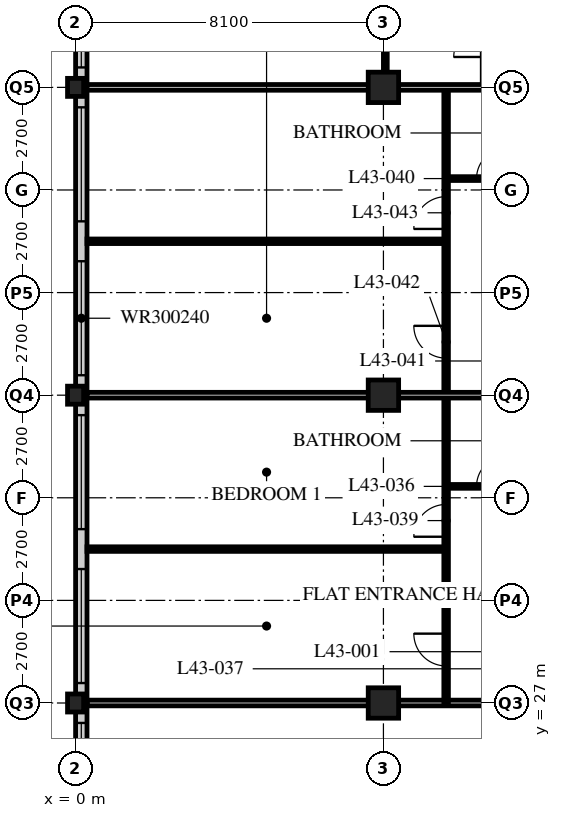
"""IFC4 building model, lengths in metres.
Left out: names, types, materials, properties, quantities, classifications, styles, units other than length and angle.
Written with IfcOpenShell. Run it as: python <this file> out.ifc"""

import sys

from ifc_helpers import new_model, si_unit, direction, frame, frame_2d, origin, origin_2d, place, context, subcontext, project, spatial, rectangle, hollow_rectangle, i_section, extrude, element, fill, save


model = new_model("IFC4")
c1 = context("Model", 3, precision=1e-05, world=origin(), true_north=direction((0.0, 1.0)))
c2 = subcontext(c1, "Body", "Model", "MODEL_VIEW")
j1 = project(units=[si_unit("LENGTHUNIT", "METRE"), si_unit("PLANEANGLEUNIT", "RADIAN")], contexts=[c1])
p1 = place(None, origin())
s1 = spatial("IfcSite", under=j1, at=p1, CompositionType="ELEMENT")
p2 = place(p1, origin())
s2 = spatial("IfcBuilding", under=s1, at=p2, CompositionType="ELEMENT")
p3 = place(p2, frame((0.0, 0.0, 170.4)))
s3 = spatial("IfcBuildingStorey", under=s2, at=p3, CompositionType="ELEMENT", Elevation=170.4)
for number, where, z_axis, x_axis in (
    (1, (0.0, 27.0, 0.0), (0.0, 0.0, 1.0), (1.0, 0.0, 0.0)),
    (2, (0.0, 35.1, 0.0), (0.0, 0.0, 1.0), (1.0, 0.0, 0.0)),
    (3, (0.0, 43.2, 0.0), (0.0, 0.0, 1.0), (1.0, 0.0, 0.0)),
):
    element("IfcColumn", number, at=place(p3, frame(where, z_axis=z_axis, x_axis=x_axis)), inside=s3, PredefinedType="COLUMN", context=c2, shape_type="SweptSolid", body=[
        extrude(i_section(OverallWidth=0.424, OverallDepth=0.475, WebThickness=0.048, FlangeThickness=0.077, FilletRadius=0.015, at=origin_2d()), origin(), (0.0, 0.0, 1.0), 3.6),
    ])
for number, where, z_axis, x_axis in (
    (4, (8.1, 27.0, 0.0), (0.0, 0.0, 1.0), (1.0, 0.0, 0.0)),
    (5, (8.1, 35.1, 0.0), (0.0, 0.0, 1.0), (1.0, 0.0, 0.0)),
    (6, (8.1, 43.2, 0.0), (0.0, 0.0, 1.0), (1.0, 0.0, 0.0)),
):
    element("IfcColumn", number, at=place(p3, frame(where, z_axis=z_axis, x_axis=x_axis)), inside=s3, PredefinedType="COLUMN", context=c2, shape_type="SweptSolid", body=[
        extrude(hollow_rectangle(XDim=0.8, YDim=0.8, WallThickness=0.08, at=origin_2d()), origin(), (0.0, 0.0, 1.0), 3.6),
    ])
p4 = place(p3, frame((0.15, 51.0, 0.0), z_axis=(0.0, 0.0, 1.0), x_axis=(0.0, -1.0, 0.0)))
e7 = element("IfcWall", 7, at=p4, inside=s3, PredefinedType="SOLIDWALL", context=c2, shape_type="SweptSolid", body=[
    extrude(rectangle(XDim=32.1, YDim=0.3, at=frame_2d((16.05, 0.0))), origin(), (0.0, 0.0, 1.0), 3.39),
])
p5 = place(p4, frame((0.225, 0.0, 0.6)))
e8 = element("IfcOpeningElement", 8, at=p5, cuts=e7, PredefinedType="OPENING", context=c2, shape_type="SweptSolid", body=[
    extrude(rectangle(XDim=3.0, YDim=2.4, at=frame_2d((1.5, 1.2))), frame((0.0, 0.16, 0.0), z_axis=(0.0, -1.0, 0.0), x_axis=(1.0, 0.0, 0.0)), (0.0, 0.0, 1.0), 0.32),
])
p6 = place(p4, frame((4.275, 0.0, 0.6)))
e9 = element("IfcOpeningElement", 9, at=p6, cuts=e7, PredefinedType="OPENING", context=c2, shape_type="SweptSolid", body=[
    extrude(rectangle(XDim=3.0, YDim=2.4, at=frame_2d((1.5, 1.2))), frame((0.0, 0.16, 0.0), z_axis=(0.0, -1.0, 0.0), x_axis=(1.0, 0.0, 0.0)), (0.0, 0.0, 1.0), 0.32),
])
p7 = place(p4, frame((8.325, 0.0, 0.6)))
e10 = element("IfcOpeningElement", 10, at=p7, cuts=e7, PredefinedType="OPENING", context=c2, shape_type="SweptSolid", body=[
    extrude(rectangle(XDim=3.0, YDim=2.4, at=frame_2d((1.5, 1.2))), frame((0.0, 0.16, 0.0), z_axis=(0.0, -1.0, 0.0), x_axis=(1.0, 0.0, 0.0)), (0.0, 0.0, 1.0), 0.32),
])
p8 = place(p4, frame((12.375, 0.0, 0.6)))
e11 = element("IfcOpeningElement", 11, at=p8, cuts=e7, PredefinedType="OPENING", context=c2, shape_type="SweptSolid", body=[
    extrude(rectangle(XDim=3.0, YDim=2.4, at=frame_2d((1.5, 1.2))), frame((0.0, 0.16, 0.0), z_axis=(0.0, -1.0, 0.0), x_axis=(1.0, 0.0, 0.0)), (0.0, 0.0, 1.0), 0.32),
])
p9 = place(p4, frame((16.425, 0.0, 0.6)))
e12 = element("IfcOpeningElement", 12, at=p9, cuts=e7, PredefinedType="OPENING", context=c2, shape_type="SweptSolid", body=[
    extrude(rectangle(XDim=3.0, YDim=2.4, at=frame_2d((1.5, 1.2))), frame((0.0, 0.16, 0.0), z_axis=(0.0, -1.0, 0.0), x_axis=(1.0, 0.0, 0.0)), (0.0, 0.0, 1.0), 0.32),
])
p10 = place(p4, frame((20.475, 0.0, 0.6)))
e13 = element("IfcOpeningElement", 13, at=p10, cuts=e7, PredefinedType="OPENING", context=c2, shape_type="SweptSolid", body=[
    extrude(rectangle(XDim=3.0, YDim=2.4, at=frame_2d((1.5, 1.2))), frame((0.0, 0.16, 0.0), z_axis=(0.0, -1.0, 0.0), x_axis=(1.0, 0.0, 0.0)), (0.0, 0.0, 1.0), 0.32),
])
p11 = place(p4, frame((24.525, 0.0, 0.6)))
e14 = element("IfcOpeningElement", 14, at=p11, cuts=e7, PredefinedType="OPENING", context=c2, shape_type="SweptSolid", body=[
    extrude(rectangle(XDim=3.0, YDim=2.4, at=frame_2d((1.5, 1.2))), frame((0.0, 0.16, 0.0), z_axis=(0.0, -1.0, 0.0), x_axis=(1.0, 0.0, 0.0)), (0.0, 0.0, 1.0), 0.32),
])
p12 = place(p4, frame((28.575, 0.0, 0.6)))
e15 = element("IfcOpeningElement", 15, at=p12, cuts=e7, PredefinedType="OPENING", context=c2, shape_type="SweptSolid", body=[
    extrude(rectangle(XDim=3.0, YDim=2.4, at=frame_2d((1.5, 1.2))), frame((0.0, 0.16, 0.0), z_axis=(0.0, -1.0, 0.0), x_axis=(1.0, 0.0, 0.0)), (0.0, 0.0, 1.0), 0.32),
])
p13 = place(p3, frame((12.15, 27.0, 0.0), z_axis=(0.0, 0.0, 1.0), x_axis=(-1.0, 0.0, 0.0)))
e16 = element("IfcWall", 16, at=p13, inside=s3, PredefinedType="PARTITIONING", context=c2, shape_type="SweptSolid", body=[
    extrude(rectangle(XDim=11.85, YDim=0.15, at=frame_2d((5.925, 0.0))), origin(), (0.0, 0.0, 1.0), 2.778),
])
p14 = place(p3, frame((9.75, 27.0, 0.0), z_axis=(0.0, 0.0, 1.0), x_axis=(0.0, 1.0, 0.0)))
e17 = element("IfcWall", 17, at=p14, inside=s3, PredefinedType="PARTITIONING", context=c2, shape_type="SweptSolid", body=[
    extrude(rectangle(XDim=16.2, YDim=0.12, at=frame_2d((8.1, 0.0))), origin(), (0.0, 0.0, 1.0), 3.39),
])
p15 = place(p14, frame((0.975, 0.0, 0.0)))
e18 = element("IfcOpeningElement", 18, at=p15, cuts=e17, PredefinedType="OPENING", context=c2, shape_type="SweptSolid", body=[
    extrude(rectangle(XDim=0.85, YDim=2.1, at=frame_2d((0.425, 1.05))), frame((0.0, 0.07, 0.0), z_axis=(0.0, -1.0, 0.0), x_axis=(1.0, 0.0, 0.0)), (0.0, 0.0, 1.0), 0.14),
])
p16 = place(p14, frame((4.375, 0.0, 0.0)))
e19 = element("IfcOpeningElement", 19, at=p16, cuts=e17, PredefinedType="OPENING", context=c2, shape_type="SweptSolid", body=[
    extrude(rectangle(XDim=0.85, YDim=2.1, at=frame_2d((0.425, 1.05))), frame((0.0, 0.07, 0.0), z_axis=(0.0, -1.0, 0.0), x_axis=(1.0, 0.0, 0.0)), (0.0, 0.0, 1.0), 0.14),
])
p17 = place(p14, frame((9.075, 0.0, 0.0)))
e20 = element("IfcOpeningElement", 20, at=p17, cuts=e17, PredefinedType="OPENING", context=c2, shape_type="SweptSolid", body=[
    extrude(rectangle(XDim=0.85, YDim=2.1, at=frame_2d((0.425, 1.05))), frame((0.0, 0.07, 0.0), z_axis=(0.0, -1.0, 0.0), x_axis=(1.0, 0.0, 0.0)), (0.0, 0.0, 1.0), 0.14),
])
p18 = place(p14, frame((12.475, 0.0, 0.0)))
e21 = element("IfcOpeningElement", 21, at=p18, cuts=e17, PredefinedType="OPENING", context=c2, shape_type="SweptSolid", body=[
    extrude(rectangle(XDim=0.85, YDim=2.1, at=frame_2d((0.425, 1.05))), frame((0.0, 0.07, 0.0), z_axis=(0.0, -1.0, 0.0), x_axis=(1.0, 0.0, 0.0)), (0.0, 0.0, 1.0), 0.14),
])
p19 = place(p3, frame((12.15, 32.7, 0.0), z_axis=(0.0, 0.0, 1.0), x_axis=(-1.0, 0.0, 0.0)))
e22 = element("IfcWall", 22, at=p19, inside=s3, PredefinedType="PARTITIONING", context=c2, shape_type="SweptSolid", body=[
    extrude(rectangle(XDim=2.4, YDim=0.1, at=frame_2d((1.2, 0.0))), origin(), (0.0, 0.0, 1.0), 3.39),
])
p20 = place(p19, frame((0.8, 0.0, 0.0)))
e23 = element("IfcOpeningElement", 23, at=p20, cuts=e22, PredefinedType="OPENING", context=c2, shape_type="SweptSolid", body=[
    extrude(rectangle(XDim=0.8, YDim=2.1, at=frame_2d((0.4, 1.05))), frame((0.0, 0.06, 0.0), z_axis=(0.0, -1.0, 0.0), x_axis=(1.0, 0.0, 0.0)), (0.0, 0.0, 1.0), 0.12),
])
p21 = place(p3, frame((9.75, 31.05, 0.0), z_axis=(0.0, 0.0, 1.0), x_axis=(-1.0, 0.0, 0.0)))
e24 = element("IfcWall", 24, at=p21, inside=s3, PredefinedType="PARTITIONING", context=c2, shape_type="SweptSolid", body=[
    extrude(rectangle(XDim=9.45, YDim=0.12, at=frame_2d((4.725, 0.0))), origin(), (0.0, 0.0, 1.0), 3.39),
])
p22 = place(p3, frame((12.15, 35.1, 0.0), z_axis=(0.0, 0.0, 1.0), x_axis=(-1.0, 0.0, 0.0)))
e25 = element("IfcWall", 25, at=p22, inside=s3, PredefinedType="PARTITIONING", context=c2, shape_type="SweptSolid", body=[
    extrude(rectangle(XDim=11.85, YDim=0.15, at=frame_2d((5.925, 0.0))), origin(), (0.0, 0.0, 1.0), 2.778),
])
p23 = place(p3, frame((12.15, 40.8, 0.0), z_axis=(0.0, 0.0, 1.0), x_axis=(-1.0, 0.0, 0.0)))
e26 = element("IfcWall", 26, at=p23, inside=s3, PredefinedType="PARTITIONING", context=c2, shape_type="SweptSolid", body=[
    extrude(rectangle(XDim=2.4, YDim=0.1, at=frame_2d((1.2, 0.0))), origin(), (0.0, 0.0, 1.0), 3.39),
])
p24 = place(p23, frame((0.8, 0.0, 0.0)))
e27 = element("IfcOpeningElement", 27, at=p24, cuts=e26, PredefinedType="OPENING", context=c2, shape_type="SweptSolid", body=[
    extrude(rectangle(XDim=0.8, YDim=2.1, at=frame_2d((0.4, 1.05))), frame((0.0, 0.06, 0.0), z_axis=(0.0, -1.0, 0.0), x_axis=(1.0, 0.0, 0.0)), (0.0, 0.0, 1.0), 0.12),
])
p25 = place(p3, frame((9.75, 39.15, 0.0), z_axis=(0.0, 0.0, 1.0), x_axis=(-1.0, 0.0, 0.0)))
e28 = element("IfcWall", 28, at=p25, inside=s3, PredefinedType="PARTITIONING", context=c2, shape_type="SweptSolid", body=[
    extrude(rectangle(XDim=9.45, YDim=0.12, at=frame_2d((4.725, 0.0))), origin(), (0.0, 0.0, 1.0), 3.39),
])
p26 = place(p3, frame((8.15, 43.2, 0.0), z_axis=(0.0, 0.0, 1.0), x_axis=(0.0, 1.0, 0.0)))
e29 = element("IfcWall", 29, at=p26, inside=s3, PredefinedType="PARTITIONING", context=c2, shape_type="SweptSolid", body=[
    extrude(rectangle(XDim=2.4, YDim=0.1, at=frame_2d((1.2, 0.0))), origin(), (0.0, 0.0, 1.0), 2.778),
])
p27 = place(p3, frame((0.3, 43.2, 0.0), z_axis=(0.0, 0.0, 1.0), x_axis=(1.0, 0.0, 0.0)))
e30 = element("IfcWall", 30, at=p27, inside=s3, PredefinedType="PARTITIONING", context=c2, shape_type="SweptSolid", body=[
    extrude(rectangle(XDim=11.85, YDim=0.15, at=frame_2d((5.925, 0.0))), origin(), (0.0, 0.0, 1.0), 2.778),
])
p28 = place(p6, origin())
e31 = element("IfcWindow", 31, at=p28, inside=s3, PartitioningType="SINGLE_PANEL", PredefinedType="WINDOW", context=c2, shape_type="SweptSolid", body=[
    extrude(rectangle(XDim=3.0, YDim=2.4, at=frame_2d((1.5, 1.2))), frame((0.0, 0.03, 0.0), z_axis=(0.0, -1.0, 0.0), x_axis=(1.0, 0.0, 0.0)), (0.0, 0.0, 1.0), 0.06),
])
fill(e9, e31)
p29 = place(p7, origin())
e32 = element("IfcWindow", 32, at=p29, inside=s3, PartitioningType="SINGLE_PANEL", PredefinedType="WINDOW", context=c2, shape_type="SweptSolid", body=[
    extrude(rectangle(XDim=3.0, YDim=2.4, at=frame_2d((1.5, 1.2))), frame((0.0, 0.03, 0.0), z_axis=(0.0, -1.0, 0.0), x_axis=(1.0, 0.0, 0.0)), (0.0, 0.0, 1.0), 0.06),
])
fill(e10, e32)
p30 = place(p8, origin())
e33 = element("IfcWindow", 33, at=p30, inside=s3, PartitioningType="SINGLE_PANEL", PredefinedType="WINDOW", context=c2, shape_type="SweptSolid", body=[
    extrude(rectangle(XDim=3.0, YDim=2.4, at=frame_2d((1.5, 1.2))), frame((0.0, 0.03, 0.0), z_axis=(0.0, -1.0, 0.0), x_axis=(1.0, 0.0, 0.0)), (0.0, 0.0, 1.0), 0.06),
])
fill(e11, e33)
p31 = place(p9, origin())
e34 = element("IfcWindow", 34, at=p31, inside=s3, PartitioningType="SINGLE_PANEL", PredefinedType="WINDOW", context=c2, shape_type="SweptSolid", body=[
    extrude(rectangle(XDim=3.0, YDim=2.4, at=frame_2d((1.5, 1.2))), frame((0.0, 0.03, 0.0), z_axis=(0.0, -1.0, 0.0), x_axis=(1.0, 0.0, 0.0)), (0.0, 0.0, 1.0), 0.06),
])
fill(e12, e34)
p32 = place(p10, origin())
e35 = element("IfcWindow", 35, at=p32, inside=s3, PartitioningType="SINGLE_PANEL", PredefinedType="WINDOW", context=c2, shape_type="SweptSolid", body=[
    extrude(rectangle(XDim=3.0, YDim=2.4, at=frame_2d((1.5, 1.2))), frame((0.0, 0.03, 0.0), z_axis=(0.0, -1.0, 0.0), x_axis=(1.0, 0.0, 0.0)), (0.0, 0.0, 1.0), 0.06),
])
fill(e13, e35)
p33 = place(p11, origin())
e36 = element("IfcWindow", 36, at=p33, inside=s3, PartitioningType="SINGLE_PANEL", PredefinedType="WINDOW", context=c2, shape_type="SweptSolid", body=[
    extrude(rectangle(XDim=3.0, YDim=2.4, at=frame_2d((1.5, 1.2))), frame((0.0, 0.03, 0.0), z_axis=(0.0, -1.0, 0.0), x_axis=(1.0, 0.0, 0.0)), (0.0, 0.0, 1.0), 0.06),
])
fill(e14, e36)
p34 = place(p20, origin())
e37 = element("IfcDoor", 37, at=p34, inside=s3, OperationType="SINGLE_SWING_RIGHT", PredefinedType="DOOR", context=c2, shape_type="SweptSolid", body=[
    extrude(rectangle(XDim=0.8, YDim=2.1, at=frame_2d((0.4, 1.05))), frame((0.0, 0.025, 0.0), z_axis=(0.0, -1.0, 0.0), x_axis=(1.0, 0.0, 0.0)), (0.0, 0.0, 1.0), 0.05),
])
fill(e23, e37)
p35 = place(p15, origin())
e38 = element("IfcDoor", 38, at=p35, inside=s3, OperationType="SINGLE_SWING_RIGHT", PredefinedType="DOOR", context=c2, shape_type="SweptSolid", body=[
    extrude(rectangle(XDim=0.85, YDim=2.1, at=frame_2d((0.425, 1.05))), frame((0.0, 0.025, 0.0), z_axis=(0.0, -1.0, 0.0), x_axis=(1.0, 0.0, 0.0)), (0.0, 0.0, 1.0), 0.05),
])
fill(e18, e38)
p36 = place(p16, origin())
e39 = element("IfcDoor", 39, at=p36, inside=s3, OperationType="SINGLE_SWING_LEFT", PredefinedType="DOOR", context=c2, shape_type="SweptSolid", body=[
    extrude(rectangle(XDim=0.85, YDim=2.1, at=frame_2d((0.425, 1.05))), frame((0.0, 0.025, 0.0), z_axis=(0.0, -1.0, 0.0), x_axis=(1.0, 0.0, 0.0)), (0.0, 0.0, 1.0), 0.05),
])
fill(e19, e39)
p37 = place(p24, origin())
e40 = element("IfcDoor", 40, at=p37, inside=s3, OperationType="SINGLE_SWING_RIGHT", PredefinedType="DOOR", context=c2, shape_type="SweptSolid", body=[
    extrude(rectangle(XDim=0.8, YDim=2.1, at=frame_2d((0.4, 1.05))), frame((0.0, 0.025, 0.0), z_axis=(0.0, -1.0, 0.0), x_axis=(1.0, 0.0, 0.0)), (0.0, 0.0, 1.0), 0.05),
])
fill(e27, e40)
p38 = place(p17, origin())
e41 = element("IfcDoor", 41, at=p38, inside=s3, OperationType="SINGLE_SWING_RIGHT", PredefinedType="DOOR", context=c2, shape_type="SweptSolid", body=[
    extrude(rectangle(XDim=0.85, YDim=2.1, at=frame_2d((0.425, 1.05))), frame((0.0, 0.025, 0.0), z_axis=(0.0, -1.0, 0.0), x_axis=(1.0, 0.0, 0.0)), (0.0, 0.0, 1.0), 0.05),
])
fill(e20, e41)
p39 = place(p18, origin())
e42 = element("IfcDoor", 42, at=p39, inside=s3, OperationType="SINGLE_SWING_LEFT", PredefinedType="DOOR", context=c2, shape_type="SweptSolid", body=[
    extrude(rectangle(XDim=0.85, YDim=2.1, at=frame_2d((0.425, 1.05))), frame((0.0, 0.025, 0.0), z_axis=(0.0, -1.0, 0.0), x_axis=(1.0, 0.0, 0.0)), (0.0, 0.0, 1.0), 0.05),
])
fill(e21, e42)
save(model, sys.argv[1])
